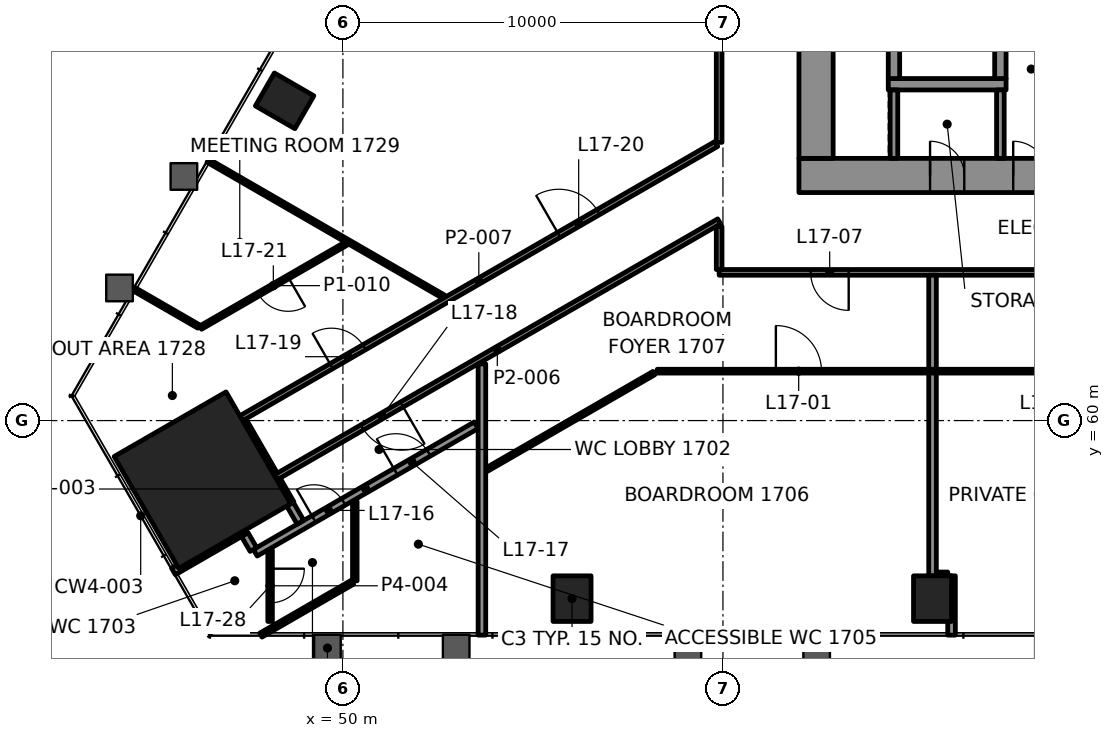
"""IFC4 building model, lengths in metres.
Left out: names, types, materials, properties, quantities, classifications, styles, units other than length and angle.
Written with IfcOpenShell. Run it as: python <this file> out.ifc"""

import sys

from ifc_helpers import new_model, si_unit, direction, frame, frame_2d, origin, origin_2d, place, context, subcontext, project, spatial, rectangle, extrude, element, fill, save


model = new_model("IFC4")
c1 = context("Model", 3, precision=1e-05, world=origin(), true_north=direction((0.0, 1.0)))
c2 = subcontext(c1, "Body", "Model", "MODEL_VIEW")
j1 = project(units=[si_unit("LENGTHUNIT", "METRE"), si_unit("PLANEANGLEUNIT", "RADIAN")], contexts=[c1])
p1 = place(None, origin())
s1 = spatial("IfcSite", under=j1, at=p1, CompositionType="ELEMENT")
p2 = place(p1, origin())
s2 = spatial("IfcBuilding", under=s1, at=p2, CompositionType="ELEMENT")
p3 = place(p2, frame((0.0, 0.0, 77.8)))
s3 = spatial("IfcBuildingStorey", under=s2, at=p3, CompositionType="ELEMENT", Elevation=77.8)
p4 = place(p3, frame((46.303, 58.432, 0.0), z_axis=(0.0, 0.0, 1.0), x_axis=(0.5, -0.866025403784, 0.0)))
e1 = element("IfcColumn", 1, at=p4, inside=s3, PredefinedType="COLUMN", context=c2, shape_type="SweptSolid", body=[
    extrude(rectangle(XDim=3.4, YDim=3.4, at=origin_2d()), origin(), (0.0, 0.0, 1.0), 4.2),
])
for number, where, z_axis, x_axis in (
    (2, (56.029, 55.314, -0.0), (0.0, 0.0, 1.0), (1.0, 0.0, 0.0)),
    (3, (65.515, 55.314, -0.0), (0.0, 0.0, 1.0), (1.0, 0.0, 0.0)),
    (4, (48.466, 68.414, -0.0), (0.0, 0.0, 1.0), (-0.5, -0.866, 0.0)),
):
    element("IfcColumn", number, at=place(p3, frame(where, z_axis=z_axis, x_axis=x_axis)), inside=s3, PredefinedType="COLUMN", context=c2, shape_type="SweptSolid", body=[
        extrude(rectangle(XDim=1.0, YDim=1.2, at=origin_2d()), origin(), (0.0, 0.0, 1.0), 4.2),
    ])
p5 = place(p3, frame((62.0, 66.45, 0.0), z_axis=(0.0, 0.0, 1.0), x_axis=(1.0, 0.0, 0.0)))
e5 = element("IfcWall", 5, at=p5, inside=s3, PredefinedType="SHEAR", context=c2, shape_type="SweptSolid", body=[
    extrude(rectangle(XDim=26.0, YDim=0.9, at=frame_2d((13.0, 0.0))), origin(), (0.0, 0.0, 1.0), 4.0),
])
p6 = place(p5, frame((3.45, 0.0, 0.0)))
e6 = element("IfcOpeningElement", 6, at=p6, cuts=e5, PredefinedType="OPENING", context=c2, shape_type="SweptSolid", body=[
    extrude(rectangle(XDim=0.9, YDim=2.1, at=frame_2d((0.45, 1.05))), frame((0.0, 0.46, 0.0), z_axis=(0.0, -1.0, 0.0), x_axis=(1.0, 0.0, 0.0)), (0.0, 0.0, 1.0), 0.92),
])
p7 = place(p5, frame((5.637, 0.0, 0.0)))
e7 = element("IfcOpeningElement", 7, at=p7, cuts=e5, PredefinedType="OPENING", context=c2, shape_type="SweptSolid", body=[
    extrude(rectangle(XDim=0.9, YDim=2.1, at=frame_2d((0.45, 1.05))), frame((0.0, 0.46, 0.0), z_axis=(0.0, -1.0, 0.0), x_axis=(1.0, 0.0, 0.0)), (0.0, 0.0, 1.0), 0.92),
])
p8 = place(p5, frame((7.212, 0.0, 0.0)))
e8 = element("IfcOpeningElement", 8, at=p8, cuts=e5, PredefinedType="OPENING", context=c2, shape_type="SweptSolid", body=[
    extrude(rectangle(XDim=0.9, YDim=2.1, at=frame_2d((0.45, 1.05))), frame((0.0, 0.46, 0.0), z_axis=(0.0, -1.0, 0.0), x_axis=(1.0, 0.0, 0.0)), (0.0, 0.0, 1.0), 0.92),
])
p9 = place(p5, frame((8.999, 0.0, 0.0)))
e9 = element("IfcOpeningElement", 9, at=p9, cuts=e5, PredefinedType="OPENING", context=c2, shape_type="SweptSolid", body=[
    extrude(rectangle(XDim=0.9, YDim=2.1, at=frame_2d((0.45, 1.05))), frame((0.0, 0.46, 0.0), z_axis=(0.0, -1.0, 0.0), x_axis=(1.0, 0.0, 0.0)), (0.0, 0.0, 1.0), 0.92),
])
p10 = place(p5, frame((17.324, 0.0, 0.0)))
e10 = element("IfcOpeningElement", 10, at=p10, cuts=e5, PredefinedType="OPENING", context=c2, shape_type="SweptSolid", body=[
    extrude(rectangle(XDim=0.9, YDim=2.1, at=frame_2d((0.45, 1.05))), frame((0.0, 0.46, 0.0), z_axis=(0.0, -1.0, 0.0), x_axis=(1.0, 0.0, 0.0)), (0.0, 0.0, 1.0), 0.92),
])
p11 = place(p3, frame((62.45, 66.9, 0.0), z_axis=(0.0, 0.0, 1.0), x_axis=(0.0, 1.0, 0.0)))
e11 = element("IfcWall", 11, at=p11, inside=s3, PredefinedType="SHEAR", context=c2, shape_type="SweptSolid", body=[
    extrude(rectangle(XDim=16.2, YDim=0.9, at=frame_2d((8.1, 0.0))), origin(), (0.0, 0.0, 1.0), 4.0),
])
p12 = place(p11, frame((5.5, 0.0, 0.0)))
e12 = element("IfcOpeningElement", 12, at=p12, cuts=e11, PredefinedType="OPENING", context=c2, shape_type="SweptSolid", body=[
    extrude(rectangle(XDim=1.8, YDim=2.1, at=frame_2d((0.9, 1.05))), frame((0.0, 0.46, 0.0), z_axis=(0.0, -1.0, 0.0), x_axis=(1.0, 0.0, 0.0)), (0.0, 0.0, 1.0), 0.92),
])
p13 = place(p3, frame((64.35, 68.85, 0.0), z_axis=(0.0, 0.0, 1.0), x_axis=(1.0, 0.0, 0.0)))
e13 = element("IfcWall", 13, at=p13, inside=s3, PredefinedType="SHEAR", context=c2, shape_type="SweptSolid", body=[
    extrude(rectangle(XDim=3.1, YDim=0.3, at=frame_2d((1.55, 0.0))), origin(), (0.0, 0.0, 1.0), 4.0),
])
for number, where, z_axis, x_axis in (
    (14, (64.5, 69.0, 0.0), (0.0, 0.0, 1.0), (0.0, 1.0, 0.0)),
    (15, (67.3, 69.0, 0.0), (0.0, 0.0, 1.0), (0.0, 1.0, 0.0)),
):
    element("IfcWall", number, at=place(p3, frame(where, z_axis=z_axis, x_axis=x_axis)), inside=s3, PredefinedType="SHEAR", context=c2, shape_type="SweptSolid", body=[
        extrude(rectangle(XDim=2.6, YDim=0.3, at=frame_2d((1.3, 0.0))), origin(), (0.0, 0.0, 1.0), 4.0),
    ])
p14 = place(p3, frame((65.625, 55.914, 0.0), z_axis=(0.0, 0.0, 1.0), x_axis=(1.0, 0.0, 0.0)))
e16 = element("IfcWall", 16, at=p14, inside=s3, PredefinedType="PARTITIONING", context=c2, shape_type="SweptSolid", body=[
    extrude(rectangle(XDim=0.29, YDim=0.2, at=frame_2d((0.145, 0.0))), origin(), (0.0, 0.0, 1.0), 3.4),
])
p15 = place(p3, frame((58.271, 61.3, 0.0), z_axis=(0.0, 0.0, 1.0), x_axis=(1.0, 0.0, 0.0)))
e17 = element("IfcWall", 17, at=p15, inside=s3, PredefinedType="PARTITIONING", context=c2, shape_type="SweptSolid", body=[
    extrude(rectangle(XDim=26.214, YDim=0.1, at=frame_2d((13.107, 0.0))), origin(), (0.0, 0.0, 1.0), 3.4),
])
p16 = place(p15, frame((3.122, 0.0, 0.0)))
e18 = element("IfcOpeningElement", 18, at=p16, cuts=e17, PredefinedType="OPENING", context=c2, shape_type="SweptSolid", body=[
    extrude(rectangle(XDim=1.2, YDim=2.1, at=frame_2d((0.6, 1.05))), frame((0.0, 0.06, 0.0), z_axis=(0.0, -1.0, 0.0), x_axis=(1.0, 0.0, 0.0)), (0.0, 0.0, 1.0), 0.12),
])
p17 = place(p15, frame((9.957, 0.0, 0.0)))
e19 = element("IfcOpeningElement", 19, at=p17, cuts=e17, PredefinedType="OPENING", context=c2, shape_type="SweptSolid", body=[
    extrude(rectangle(XDim=0.9, YDim=2.1, at=frame_2d((0.45, 1.05))), frame((0.0, 0.06, 0.0), z_axis=(0.0, -1.0, 0.0), x_axis=(1.0, 0.0, 0.0)), (0.0, 0.0, 1.0), 0.12),
])
p18 = place(p15, frame((16.279, 0.0, 0.0)))
e20 = element("IfcOpeningElement", 20, at=p18, cuts=e17, PredefinedType="OPENING", context=c2, shape_type="SweptSolid", body=[
    extrude(rectangle(XDim=0.9, YDim=2.1, at=frame_2d((0.45, 1.05))), frame((0.0, 0.06, 0.0), z_axis=(0.0, -1.0, 0.0), x_axis=(1.0, 0.0, 0.0)), (0.0, 0.0, 1.0), 0.12),
])
p19 = place(p15, frame((22.501, 0.0, 0.0)))
e21 = element("IfcOpeningElement", 21, at=p19, cuts=e17, PredefinedType="OPENING", context=c2, shape_type="SweptSolid", body=[
    extrude(rectangle(XDim=0.9, YDim=2.1, at=frame_2d((0.45, 1.05))), frame((0.0, 0.06, 0.0), z_axis=(0.0, -1.0, 0.0), x_axis=(1.0, 0.0, 0.0)), (0.0, 0.0, 1.0), 0.12),
])
p20 = place(p3, frame((90.099, 63.9, 0.0), z_axis=(0.0, 0.0, 1.0), x_axis=(-1.0, 0.0, 0.0)))
e22 = element("IfcWall", 22, at=p20, inside=s3, PredefinedType="PARTITIONING", context=c2, shape_type="SweptSolid", body=[
    extrude(rectangle(XDim=30.199, YDim=0.15, at=frame_2d((15.1, 0.0))), origin(), (0.0, 0.0, 1.0), 3.4),
])
p21 = place(p20, frame((2.309, 0.0, 0.0)))
e23 = element("IfcOpeningElement", 23, at=p21, cuts=e22, PredefinedType="OPENING", context=c2, shape_type="SweptSolid", body=[
    extrude(rectangle(XDim=1.2, YDim=2.1, at=frame_2d((0.6, 1.05))), frame((0.0, 0.085, 0.0), z_axis=(0.0, -1.0, 0.0), x_axis=(1.0, 0.0, 0.0)), (0.0, 0.0, 1.0), 0.17),
])
p22 = place(p20, frame((14.599, 0.0, 0.0)))
e24 = element("IfcOpeningElement", 24, at=p22, cuts=e22, PredefinedType="OPENING", context=c2, shape_type="SweptSolid", body=[
    extrude(rectangle(XDim=1.0, YDim=2.1, at=frame_2d((0.5, 1.05))), frame((0.0, 0.085, 0.0), z_axis=(0.0, -1.0, 0.0), x_axis=(1.0, 0.0, 0.0)), (0.0, 0.0, 1.0), 0.17),
])
p23 = place(p20, frame((26.791, 0.0, 0.0)))
e25 = element("IfcOpeningElement", 25, at=p23, cuts=e22, PredefinedType="OPENING", context=c2, shape_type="SweptSolid", body=[
    extrude(rectangle(XDim=1.0, YDim=2.1, at=frame_2d((0.5, 1.05))), frame((0.0, 0.085, 0.0), z_axis=(0.0, -1.0, 0.0), x_axis=(1.0, 0.0, 0.0)), (0.0, 0.0, 1.0), 0.17),
])
p24 = place(p3, frame((47.84, 54.354, 0.0), z_axis=(0.0, 0.0, 1.0), x_axis=(0.866007574053, 0.500030880729, 0.0)))
e26 = element("IfcWall", 26, at=p24, inside=s3, PredefinedType="PARTITIONING", context=c2, shape_type="SweptSolid", body=[
    extrude(rectangle(XDim=2.786, YDim=0.12, at=frame_2d((1.393, 0.0))), origin(), (0.0, 0.0, 1.0), 3.4),
])
p25 = place(p3, frame((53.784, 58.71, 0.0), z_axis=(0.0, 0.0, 1.0), x_axis=(0.866049563981, 0.499958150978, 0.0)))
e27 = element("IfcWall", 27, at=p25, inside=s3, PredefinedType="PARTITIONING", context=c2, shape_type="SweptSolid", body=[
    extrude(rectangle(XDim=5.081, YDim=0.1, at=frame_2d((2.541, 0.0))), origin(), (0.0, 0.0, 1.0), 3.4),
])
p26 = place(p3, frame((47.695, 56.521, 0.0), z_axis=(0.0, 0.0, 1.0), x_axis=(0.86602261799, 0.500004825106, 0.0)))
e28 = element("IfcWall", 28, at=p26, inside=s3, PredefinedType="PARTITIONING", context=c2, shape_type="SweptSolid", body=[
    extrude(rectangle(XDim=6.711, YDim=0.2, at=frame_2d((3.355, 0.0))), origin(), (0.0, 0.0, 1.0), 3.4),
])
p27 = place(p26, frame((1.779, 0.0, 0.0)))
e29 = element("IfcOpeningElement", 29, at=p27, cuts=e28, PredefinedType="OPENING", context=c2, shape_type="SweptSolid", body=[
    extrude(rectangle(XDim=0.9, YDim=2.1, at=frame_2d((0.45, 1.05))), frame((0.0, 0.11, 0.0), z_axis=(0.0, -1.0, 0.0), x_axis=(1.0, 0.0, 0.0)), (0.0, 0.0, 1.0), 0.22),
])
p28 = place(p26, frame((4.266, 0.0, 0.0)))
e30 = element("IfcOpeningElement", 30, at=p28, cuts=e28, PredefinedType="OPENING", context=c2, shape_type="SweptSolid", body=[
    extrude(rectangle(XDim=1.0, YDim=2.1, at=frame_2d((0.5, 1.05))), frame((0.0, 0.11, 0.0), z_axis=(0.0, -1.0, 0.0), x_axis=(1.0, 0.0, 0.0)), (0.0, 0.0, 1.0), 0.22),
])
p29 = place(p3, frame((45.542, 56.03, 0.0), z_axis=(0.0, 0.0, 1.0), x_axis=(0.866062227083, 0.499936214752, 0.0)))
e31 = element("IfcWall", 31, at=p29, inside=s3, PredefinedType="PARTITIONING", context=c2, shape_type="SweptSolid", body=[
    extrude(rectangle(XDim=2.109, YDim=0.2, at=frame_2d((1.055, 0.0))), origin(), (0.0, 0.0, 1.0), 3.4),
])
p30 = place(p3, frame((59.9, 65.243, 0.0), z_axis=(0.0, 0.0, 1.0), x_axis=(-0.866023326939, -0.500003597184, 0.0)))
e32 = element("IfcWall", 32, at=p30, inside=s3, PredefinedType="PARTITIONING", context=c2, shape_type="SweptSolid", body=[
    extrude(rectangle(XDim=13.48, YDim=0.15, at=frame_2d((6.74, 0.0))), origin(), (0.0, 0.0, 1.0), 3.247),
])
p31 = place(p30, frame((9.643, 0.0, 0.0)))
e33 = element("IfcOpeningElement", 33, at=p31, cuts=e32, PredefinedType="OPENING", context=c2, shape_type="SweptSolid", body=[
    extrude(rectangle(XDim=1.2, YDim=2.1, at=frame_2d((0.6, 1.05))), frame((0.0, 0.085, 0.0), z_axis=(0.0, -1.0, 0.0), x_axis=(1.0, 0.0, 0.0)), (0.0, 0.0, 1.0), 0.17),
])
p32 = place(p3, frame((47.328, 60.063, 0.0), z_axis=(0.0, 0.0, 1.0), x_axis=(0.86602527873, 0.500000216601, 0.0)))
e34 = element("IfcWall", 34, at=p32, inside=s3, PredefinedType="PARTITIONING", context=c2, shape_type="SweptSolid", body=[
    extrude(rectangle(XDim=14.431, YDim=0.15, at=frame_2d((7.215, 0.0))), origin(), (0.0, 0.0, 1.0), 3.4),
])
p33 = place(p32, frame((2.737, 0.0, 0.0)))
e35 = element("IfcOpeningElement", 35, at=p33, cuts=e34, PredefinedType="OPENING", context=c2, shape_type="SweptSolid", body=[
    extrude(rectangle(XDim=1.0, YDim=2.1, at=frame_2d((0.5, 1.05))), frame((0.0, 0.085, 0.0), z_axis=(0.0, -1.0, 0.0), x_axis=(1.0, 0.0, 0.0)), (0.0, 0.0, 1.0), 0.17),
])
p34 = place(p32, frame((9.649, 0.0, 0.0)))
e36 = element("IfcOpeningElement", 36, at=p34, cuts=e34, PredefinedType="OPENING", context=c2, shape_type="SweptSolid", body=[
    extrude(rectangle(XDim=1.2, YDim=2.1, at=frame_2d((0.6, 1.05))), frame((0.0, 0.085, 0.0), z_axis=(0.0, -1.0, 0.0), x_axis=(1.0, 0.0, 0.0)), (0.0, 0.0, 1.0), 0.17),
])
p35 = place(p3, frame((50.082, 64.655, 0.0), z_axis=(0.0, 0.0, 1.0), x_axis=(-0.866030989016, -0.499990325971, 0.0)))
e37 = element("IfcWall", 37, at=p35, inside=s3, PredefinedType="PARTITIONING", context=c2, shape_type="SweptSolid", body=[
    extrude(rectangle(XDim=4.418, YDim=0.1, at=frame_2d((2.209, 0.0))), origin(), (0.0, 0.0, 1.0), 3.4),
])
p36 = place(p35, frame((1.759, 0.0, 0.0)))
e38 = element("IfcOpeningElement", 38, at=p36, cuts=e37, PredefinedType="OPENING", context=c2, shape_type="SweptSolid", body=[
    extrude(rectangle(XDim=0.9, YDim=2.1, at=frame_2d((0.45, 1.05))), frame((0.0, 0.06, 0.0), z_axis=(0.0, -1.0, 0.0), x_axis=(1.0, 0.0, 0.0)), (0.0, 0.0, 1.0), 0.12),
])
p37 = place(p3, frame((66.015, 54.354, 0.0), z_axis=(0.0, 0.0, 1.0), x_axis=(0.0, 1.0, 0.0)))
e39 = element("IfcWall", 39, at=p37, inside=s3, PredefinedType="PARTITIONING", context=c2, shape_type="SweptSolid", body=[
    extrude(rectangle(XDim=1.56, YDim=0.2, at=frame_2d((0.78, 0.0))), origin(), (0.0, 0.0, 1.0), 3.165),
])
p38 = place(p3, frame((65.515, 55.914, 0.0), z_axis=(0.0, 0.0, 1.0), x_axis=(0.0, 1.0, 0.0)))
e40 = element("IfcWall", 40, at=p38, inside=s3, PredefinedType="PARTITIONING", context=c2, shape_type="SweptSolid", body=[
    extrude(rectangle(XDim=5.336, YDim=0.2, at=frame_2d((2.668, 0.0))), origin(), (0.0, 0.0, 1.0), 3.4),
])
p39 = place(p3, frame((59.9, 63.975, 0.0), z_axis=(0.0, 0.0, 1.0), x_axis=(0.0, 1.0, 0.0)))
e41 = element("IfcWall", 41, at=p39, inside=s3, PredefinedType="PARTITIONING", context=c2, shape_type="SweptSolid", body=[
    extrude(rectangle(XDim=1.131, YDim=0.15, at=frame_2d((0.565, 0.0))), origin(), (0.0, 0.0, 1.0), 3.247),
])
p40 = place(p3, frame((59.9, 67.321, 0.0), z_axis=(0.0, 0.0, 1.0), x_axis=(0.0, 1.0, 0.0)))
e42 = element("IfcWall", 42, at=p40, inside=s3, PredefinedType="PARTITIONING", context=c2, shape_type="SweptSolid", body=[
    extrude(rectangle(XDim=18.778, YDim=0.15, at=frame_2d((9.389, 0.0))), origin(), (0.0, 0.0, 1.0), 3.4),
])
p41 = place(p3, frame((53.658, 54.354, 0.0), z_axis=(0.0, 0.0, 1.0), x_axis=(0.0, 1.0, 0.0)))
e43 = element("IfcWall", 43, at=p41, inside=s3, PredefinedType="PARTITIONING", context=c2, shape_type="SweptSolid", body=[
    extrude(rectangle(XDim=7.138, YDim=0.2, at=frame_2d((3.569, 0.0))), origin(), (0.0, 0.0, 1.0), 3.4),
])
p42 = place(p3, frame((50.313, 55.782, 0.0), z_axis=(0.0, 0.0, 1.0), x_axis=(0.0, 1.0, 0.0)))
e44 = element("IfcWall", 44, at=p42, inside=s3, PredefinedType="PARTITIONING", context=c2, shape_type="SweptSolid", body=[
    extrude(rectangle(XDim=2.096, YDim=0.12, at=frame_2d((1.048, 0.0))), origin(), (0.0, 0.0, 1.0), 3.4),
])
p43 = place(p3, frame((48.084, 56.591, 0.0), z_axis=(0.0, 0.0, 1.0), x_axis=(0.0, -1.0, 0.0)))
e45 = element("IfcWall", 45, at=p43, inside=s3, PredefinedType="PARTITIONING", context=c2, shape_type="SweptSolid", body=[
    extrude(rectangle(XDim=1.877, YDim=0.12, at=frame_2d((0.938, 0.0))), origin(), (0.0, 0.0, 1.0), 3.4),
])
p44 = place(p43, frame((0.488, 0.0, 0.0)))
e46 = element("IfcOpeningElement", 46, at=p44, cuts=e45, PredefinedType="OPENING", context=c2, shape_type="SweptSolid", body=[
    extrude(rectangle(XDim=0.9, YDim=2.1, at=frame_2d((0.45, 1.05))), frame((0.0, 0.07, 0.0), z_axis=(0.0, -1.0, 0.0), x_axis=(1.0, 0.0, 0.0)), (0.0, 0.0, 1.0), 0.14),
])
p45 = place(p3, frame((48.625, 57.81, 0.0), z_axis=(0.0, 0.0, 1.0), x_axis=(-0.500053022251, 0.865994789209, 0.0)))
e47 = element("IfcWall", 47, at=p45, inside=s3, PredefinedType="PARTITIONING", context=c2, shape_type="SweptSolid", body=[
    extrude(rectangle(XDim=0.725, YDim=0.2, at=frame_2d((0.362, 0.0))), origin(), (0.0, 0.0, 1.0), 3.4),
])
p46 = place(p3, frame((48.883, 57.323, 0.0), z_axis=(0.0, 0.0, 1.0), x_axis=(-0.499914787221, 0.866074595816, 0.0)))
e48 = element("IfcWall", 48, at=p46, inside=s3, PredefinedType="PARTITIONING", context=c2, shape_type="SweptSolid", body=[
    extrude(rectangle(XDim=0.549, YDim=0.2, at=frame_2d((0.275, 0.0))), origin(), (0.0, 0.0, 1.0), 3.4),
])
p47 = place(p3, frame((47.644, 56.608, 0.0), z_axis=(0.0, 0.0, 1.0), x_axis=(-0.499644091975, 0.866230789891, 0.0)))
e49 = element("IfcWall", 49, at=p47, inside=s3, PredefinedType="PARTITIONING", context=c2, shape_type="SweptSolid", body=[
    extrude(rectangle(XDim=0.449, YDim=0.2, at=frame_2d((0.225, 0.0))), origin(), (0.0, 0.0, 1.0), 3.4),
])
p48 = place(p3, frame((52.657, 63.256, 0.0), z_axis=(0.0, 0.0, 1.0), x_axis=(-0.866014863173, 0.50001825643, 0.0)))
e50 = element("IfcWall", 50, at=p48, inside=s3, PredefinedType="PARTITIONING", context=c2, shape_type="SweptSolid", body=[
    extrude(rectangle(XDim=7.168, YDim=0.1, at=frame_2d((3.584, 0.0))), origin(), (0.0, 0.0, 1.0), 3.4),
])
p49 = place(p3, frame((46.206, 62.475, 0.0), z_axis=(0.0, 0.0, 1.0), x_axis=(-0.866033041146, 0.499986771468, 0.0)))
e51 = element("IfcWall", 51, at=p49, inside=s3, PredefinedType="PARTITIONING", context=c2, shape_type="SweptSolid", body=[
    extrude(rectangle(XDim=1.972, YDim=0.1, at=frame_2d((0.986, 0.0))), origin(), (0.0, 0.0, 1.0), 3.4),
])
p50 = place(p3, frame((48.187, 58.567, 0.0), z_axis=(0.0, 0.0, 1.0), x_axis=(-0.500013311227, 0.866017718408, 0.0)))
e52 = element("IfcWall", 52, at=p50, inside=s3, PredefinedType="PARTITIONING", context=c2, shape_type="SweptSolid", body=[
    extrude(rectangle(XDim=1.647, YDim=0.2, at=frame_2d((0.823, 0.0))), origin(), (0.0, 0.0, 1.0), 3.247),
])
p51 = place(p3, frame((65.515, 61.35, 0.0), z_axis=(0.0, 0.0, 1.0), x_axis=(0.0, 1.0, 0.0)))
e53 = element("IfcWall", 53, at=p51, inside=s3, PredefinedType="PARTITIONING", context=c2, shape_type="SweptSolid", body=[
    extrude(rectangle(XDim=2.475, YDim=0.2, at=frame_2d((1.237, 0.0))), origin(), (0.0, 0.0, 1.0), 3.4),
])
for number, where, z_axis, x_axis in (
    (54, (64.5, 66.9, 0.0), (0.0, 0.0, 1.0), (0.0, 1.0, 0.0)),
    (55, (67.3, 66.9, 0.0), (0.0, 0.0, 1.0), (0.0, 1.0, 0.0)),
):
    element("IfcWall", number, at=place(p3, frame(where, z_axis=z_axis, x_axis=x_axis)), inside=s3, PredefinedType="PARTITIONING", context=c2, shape_type="SweptSolid", body=[
        extrude(rectangle(XDim=1.8, YDim=0.2, at=frame_2d((0.9, 0.0))), origin(), (0.0, 0.0, 1.0), 4.0),
    ])
p52 = place(p16, origin())
e56 = element("IfcDoor", 56, at=p52, inside=s3, OperationType="DOUBLE_DOOR_SINGLE_SWING", PredefinedType="DOOR", context=c2, shape_type="SweptSolid", body=[
    extrude(rectangle(XDim=1.2, YDim=2.1, at=frame_2d((0.6, 1.05))), frame((0.0, 0.025, 0.0), z_axis=(0.0, -1.0, 0.0), x_axis=(1.0, 0.0, 0.0)), (0.0, 0.0, 1.0), 0.05),
])
fill(e18, e56)
p53 = place(p23, origin())
e57 = element("IfcDoor", 57, at=p53, inside=s3, OperationType="SINGLE_SWING_LEFT", PredefinedType="DOOR", context=c2, shape_type="SweptSolid", body=[
    extrude(rectangle(XDim=1.0, YDim=2.1, at=frame_2d((0.5, 1.05))), frame((0.0, 0.025, 0.0), z_axis=(0.0, -1.0, 0.0), x_axis=(1.0, 0.0, 0.0)), (0.0, 0.0, 1.0), 0.05),
])
fill(e25, e57)
p54 = place(p27, origin())
e58 = element("IfcDoor", 58, at=p54, inside=s3, OperationType="SINGLE_SWING_LEFT", PredefinedType="DOOR", context=c2, shape_type="SweptSolid", body=[
    extrude(rectangle(XDim=0.9, YDim=2.1, at=frame_2d((0.45, 1.05))), frame((0.0, 0.025, 0.0), z_axis=(0.0, -1.0, 0.0), x_axis=(1.0, 0.0, 0.0)), (0.0, 0.0, 1.0), 0.05),
])
fill(e29, e58)
p55 = place(p28, origin())
e59 = element("IfcDoor", 59, at=p55, inside=s3, OperationType="SINGLE_SWING_RIGHT", PredefinedType="DOOR", context=c2, shape_type="SweptSolid", body=[
    extrude(rectangle(XDim=1.0, YDim=2.1, at=frame_2d((0.5, 1.05))), frame((0.0, 0.025, 0.0), z_axis=(0.0, -1.0, 0.0), x_axis=(1.0, 0.0, 0.0)), (0.0, 0.0, 1.0), 0.05),
])
fill(e30, e59)
p56 = place(p31, origin())
e60 = element("IfcDoor", 60, at=p56, inside=s3, OperationType="DOUBLE_DOOR_SINGLE_SWING", PredefinedType="DOOR", context=c2, shape_type="SweptSolid", body=[
    extrude(rectangle(XDim=1.2, YDim=2.1, at=frame_2d((0.6, 1.05))), frame((0.0, 0.025, 0.0), z_axis=(0.0, -1.0, 0.0), x_axis=(1.0, 0.0, 0.0)), (0.0, 0.0, 1.0), 0.05),
])
fill(e33, e60)
p57 = place(p33, origin())
e61 = element("IfcDoor", 61, at=p57, inside=s3, OperationType="SINGLE_SWING_LEFT", PredefinedType="DOOR", context=c2, shape_type="SweptSolid", body=[
    extrude(rectangle(XDim=1.0, YDim=2.1, at=frame_2d((0.5, 1.05))), frame((0.0, 0.025, 0.0), z_axis=(0.0, -1.0, 0.0), x_axis=(1.0, 0.0, 0.0)), (0.0, 0.0, 1.0), 0.05),
])
fill(e35, e61)
p58 = place(p34, origin())
e62 = element("IfcDoor", 62, at=p58, inside=s3, OperationType="DOUBLE_DOOR_SINGLE_SWING", PredefinedType="DOOR", context=c2, shape_type="SweptSolid", body=[
    extrude(rectangle(XDim=1.2, YDim=2.1, at=frame_2d((0.6, 1.05))), frame((0.0, 0.025, 0.0), z_axis=(0.0, -1.0, 0.0), x_axis=(1.0, 0.0, 0.0)), (0.0, 0.0, 1.0), 0.05),
])
fill(e36, e62)
p59 = place(p36, origin())
e63 = element("IfcDoor", 63, at=p59, inside=s3, OperationType="SINGLE_SWING_LEFT", PredefinedType="DOOR", context=c2, shape_type="SweptSolid", body=[
    extrude(rectangle(XDim=0.9, YDim=2.1, at=frame_2d((0.45, 1.05))), frame((0.0, 0.025, 0.0), z_axis=(0.0, -1.0, 0.0), x_axis=(1.0, 0.0, 0.0)), (0.0, 0.0, 1.0), 0.05),
])
fill(e38, e63)
p60 = place(p44, origin())
e64 = element("IfcDoor", 64, at=p60, inside=s3, OperationType="SINGLE_SWING_LEFT", PredefinedType="DOOR", context=c2, shape_type="SweptSolid", body=[
    extrude(rectangle(XDim=0.9, YDim=2.1, at=frame_2d((0.45, 1.05))), frame((0.0, 0.025, 0.0), z_axis=(0.0, -1.0, 0.0), x_axis=(1.0, 0.0, 0.0)), (0.0, 0.0, 1.0), 0.05),
])
fill(e46, e64)
p61 = place(p6, origin())
e65 = element("IfcDoor", 65, at=p61, inside=s3, OperationType="SINGLE_SWING_LEFT", PredefinedType="DOOR", context=c2, shape_type="SweptSolid", body=[
    extrude(rectangle(XDim=0.9, YDim=2.1, at=frame_2d((0.45, 1.05))), frame((0.0, 0.17, 0.0), z_axis=(0.0, -1.0, 0.0), x_axis=(1.0, 0.0, 0.0)), (0.0, 0.0, 1.0), 0.34),
])
fill(e6, e65)
p62 = place(p7, origin())
e66 = element("IfcDoor", 66, at=p62, inside=s3, OperationType="SINGLE_SWING_RIGHT", PredefinedType="DOOR", context=c2, shape_type="SweptSolid", body=[
    extrude(rectangle(XDim=0.9, YDim=2.1, at=frame_2d((0.45, 1.05))), frame((0.0, 0.17, 0.0), z_axis=(0.0, -1.0, 0.0), x_axis=(1.0, 0.0, 0.0)), (0.0, 0.0, 1.0), 0.34),
])
fill(e7, e66)
save(model, sys.argv[1])
